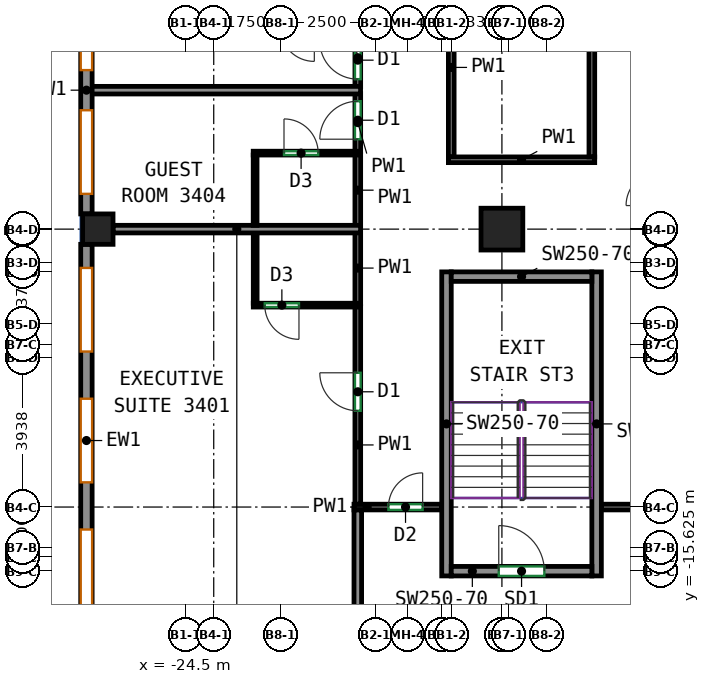
"""IFC4 building model, lengths in metres.
Left out: names, types, materials, properties, quantities, classifications, styles, units other than length and angle.
Written with IfcOpenShell. Run it as: python <this file> out.ifc"""

import sys

from ifc_helpers import new_model, si_unit, direction, frame, frame_2d, origin, origin_2d, place, context, subcontext, project, spatial, rectangle, extrude, source, transform, mapped, element, fill, save


model = new_model("IFC4")
c1 = context("Model", 3, precision=1e-05, world=origin(), true_north=direction((0.0, 1.0)))
c2 = subcontext(c1, "Body", "Model", "MODEL_VIEW")
j1 = project(units=[si_unit("LENGTHUNIT", "METRE"), si_unit("PLANEANGLEUNIT", "RADIAN")], contexts=[c1])
p1 = place(None, origin())
s1 = spatial("IfcSite", under=j1, at=p1, CompositionType="ELEMENT")
p2 = place(p1, origin())
s2 = spatial("IfcBuilding", under=s1, at=p2, CompositionType="ELEMENT")
p3 = place(p2, frame((0.0, 0.0, 150.7)))
s3 = spatial("IfcBuildingStorey", under=s2, at=p3, CompositionType="ELEMENT", Elevation=150.7)
m1 = source(origin(), c2, "Body", "SweptSolid", [
    extrude(rectangle(XDim=0.8, YDim=0.8, at=origin_2d()), origin(), (0.0, 0.0, 1.0), 3.12),
])
p4 = place(p3, frame((-26.8, -6.625, 0.0), z_axis=(0.0, 0.0, 1.0), x_axis=(1.0, 0.0, 0.0)))
e1 = element("IfcColumn", 1, at=p4, inside=s3, PredefinedType="COLUMN", context=c2, shape_type="MappedRepresentation", body=[
    mapped(m1, transform((0.0, 0.0, 0.0))),
])
m2 = source(origin(), c2, "Body", "SweptSolid", [
    extrude(rectangle(XDim=1.1, YDim=1.1, at=origin_2d()), origin(), (0.0, 0.0, 1.0), 3.12),
])
p5 = place(p3, frame((-16.167, -6.625, 0.0), z_axis=(0.0, 0.0, 1.0), x_axis=(1.0, 0.0, 0.0)))
e2 = element("IfcColumn", 2, at=p5, inside=s3, PredefinedType="COLUMN", context=c2, shape_type="MappedRepresentation", body=[
    mapped(m2, transform((0.0, 0.0, 0.0))),
])
m3 = source(origin(), c2, "Body", "SweptSolid", [
    extrude(rectangle(XDim=8.0, YDim=0.25, at=frame_2d((4.0, 0.0))), origin(), (0.0, 0.0, 1.0), 3.12),
])
for number, where, z_axis, x_axis in (
    (3, (-17.625, -15.75, 0.0), (0.0, 0.0, 1.0), (0.0, 1.0, 0.0)),
    (4, (-13.675, -15.75, 0.0), (0.0, 0.0, 1.0), (0.0, 1.0, 0.0)),
):
    element("IfcWall", number, at=place(p3, frame(where, z_axis=z_axis, x_axis=x_axis)), inside=s3, PredefinedType="SHEAR", context=c2, shape_type="MappedRepresentation", body=[
        mapped(m3, transform((0.0, 0.0, 0.0))),
    ])
m4 = source(origin(), c2, "Body", "SweptSolid", [
    extrude(rectangle(XDim=3.7, YDim=0.25, at=frame_2d((1.85, 0.0))), origin(), (0.0, 0.0, 1.0), 3.12),
])
p6 = place(p3, frame((-17.5, -15.625, 0.0), z_axis=(0.0, 0.0, 1.0), x_axis=(1.0, 0.0, 0.0)))
e5 = element("IfcWall", 5, at=p6, inside=s3, PredefinedType="SHEAR", context=c2, shape_type="MappedRepresentation", body=[
    mapped(m4, transform((0.0, 0.0, 0.0))),
])
p7 = place(p6, frame((1.25, 0.0, 0.0)))
e6 = element("IfcOpeningElement", 6, at=p7, cuts=e5, PredefinedType="OPENING", context=c2, shape_type="SweptSolid", body=[
    extrude(rectangle(XDim=1.2, YDim=2.1, at=frame_2d((0.6, 1.05))), frame((0.0, 0.135, 0.0), z_axis=(0.0, -1.0, 0.0), x_axis=(1.0, 0.0, 0.0)), (0.0, 0.0, 1.0), 0.27),
])
p8 = place(p3, frame((-17.5, -7.875, 0.0), z_axis=(0.0, 0.0, 1.0), x_axis=(1.0, 0.0, 0.0)))
e7 = element("IfcWall", 7, at=p8, inside=s3, PredefinedType="SHEAR", context=c2, shape_type="MappedRepresentation", body=[
    mapped(m4, transform((0.0, 0.0, 0.0))),
])
m5 = source(origin(), c2, "Body", "SweptSolid", [
    extrude(rectangle(XDim=6.513, YDim=0.3, at=frame_2d((3.256, 0.0))), origin(), (0.0, 0.0, 1.0), 3.12),
])
p9 = place(p3, frame((-27.1, 0.288, 0.0), z_axis=(0.0, 0.0, 1.0), x_axis=(0.0, -1.0, 0.0)))
e8 = element("IfcWall", 8, at=p9, inside=s3, PredefinedType="SOLIDWALL", context=c2, shape_type="MappedRepresentation", body=[
    mapped(m5, transform((0.0, 0.0, 0.0))),
])
p10 = place(p9, frame((0.528, 0.0, 0.85)))
e9 = element("IfcOpeningElement", 9, at=p10, cuts=e8, PredefinedType="OPENING", context=c2, shape_type="SweptSolid", body=[
    extrude(rectangle(XDim=2.2, YDim=1.95, at=frame_2d((1.1, 0.975))), frame((0.0, 0.16, 0.0), z_axis=(0.0, -1.0, 0.0), x_axis=(1.0, 0.0, 0.0)), (0.0, 0.0, 1.0), 0.32),
])
p11 = place(p9, frame((3.784, 0.0, 0.85)))
e10 = element("IfcOpeningElement", 10, at=p11, cuts=e8, PredefinedType="OPENING", context=c2, shape_type="SweptSolid", body=[
    extrude(rectangle(XDim=2.2, YDim=1.95, at=frame_2d((1.1, 0.975))), frame((0.0, 0.16, 0.0), z_axis=(0.0, -1.0, 0.0), x_axis=(1.0, 0.0, 0.0)), (0.0, 0.0, 1.0), 0.32),
])
m6 = source(origin(), c2, "Body", "SweptSolid", [
    extrude(rectangle(XDim=10.325, YDim=0.3, at=frame_2d((5.163, 0.0))), origin(), (0.0, 0.0, 1.0), 3.12),
])
p12 = place(p3, frame((-27.1, -7.025, 0.0), z_axis=(0.0, 0.0, 1.0), x_axis=(0.0, -1.0, 0.0)))
e11 = element("IfcWall", 11, at=p12, inside=s3, PredefinedType="SOLIDWALL", context=c2, shape_type="MappedRepresentation", body=[
    mapped(m6, transform((0.0, 0.0, 0.0))),
])
p13 = place(p12, frame((0.621, 0.0, 0.85)))
e12 = element("IfcOpeningElement", 12, at=p13, cuts=e11, PredefinedType="OPENING", context=c2, shape_type="SweptSolid", body=[
    extrude(rectangle(XDim=2.2, YDim=1.95, at=frame_2d((1.1, 0.975))), frame((0.0, 0.16, 0.0), z_axis=(0.0, -1.0, 0.0), x_axis=(1.0, 0.0, 0.0)), (0.0, 0.0, 1.0), 0.32),
])
p14 = place(p12, frame((4.062, 0.0, 0.85)))
e13 = element("IfcOpeningElement", 13, at=p14, cuts=e11, PredefinedType="OPENING", context=c2, shape_type="SweptSolid", body=[
    extrude(rectangle(XDim=2.2, YDim=1.95, at=frame_2d((1.1, 0.975))), frame((0.0, 0.16, 0.0), z_axis=(0.0, -1.0, 0.0), x_axis=(1.0, 0.0, 0.0)), (0.0, 0.0, 1.0), 0.32),
])
p15 = place(p12, frame((7.504, 0.0, 0.85)))
e14 = element("IfcOpeningElement", 14, at=p15, cuts=e11, PredefinedType="OPENING", context=c2, shape_type="SweptSolid", body=[
    extrude(rectangle(XDim=2.2, YDim=1.95, at=frame_2d((1.1, 0.975))), frame((0.0, 0.16, 0.0), z_axis=(0.0, -1.0, 0.0), x_axis=(1.0, 0.0, 0.0)), (0.0, 0.0, 1.0), 0.32),
])
p16 = place(p3, frame((-13.55, -13.938, 0.0), z_axis=(0.0, 0.0, 1.0), x_axis=(1.0, 0.0, 0.0)))
e15 = element("IfcWall", 15, at=p16, inside=s3, PredefinedType="PARTITIONING", context=c2, shape_type="SweptSolid", body=[
    extrude(rectangle(XDim=4.417, YDim=0.15, at=frame_2d((2.208, 0.0))), origin(), (0.0, 0.0, 1.0), 3.12),
])
p17 = place(p16, frame((1.468, 0.0, 0.0)))
e16 = element("IfcOpeningElement", 16, at=p17, cuts=e15, PredefinedType="OPENING", context=c2, shape_type="SweptSolid", body=[
    extrude(rectangle(XDim=1.0, YDim=2.1, at=frame_2d((0.5, 1.05))), frame((0.0, 0.085, 0.0), z_axis=(0.0, -1.0, 0.0), x_axis=(1.0, 0.0, 0.0)), (0.0, 0.0, 1.0), 0.17),
])
p18 = place(p3, frame((-20.059, -13.938, 0.0), z_axis=(0.0, 0.0, 1.0), x_axis=(1.0, 0.0, 0.0)))
e17 = element("IfcWall", 17, at=p18, inside=s3, PredefinedType="PARTITIONING", context=c2, shape_type="SweptSolid", body=[
    extrude(rectangle(XDim=2.309, YDim=0.15, at=frame_2d((1.155, 0.0))), origin(), (0.0, 0.0, 1.0), 3.12),
])
p19 = place(p18, frame((0.906, 0.0, 0.0)))
e18 = element("IfcOpeningElement", 18, at=p19, cuts=e17, PredefinedType="OPENING", context=c2, shape_type="SweptSolid", body=[
    extrude(rectangle(XDim=0.9, YDim=2.1, at=frame_2d((0.45, 1.05))), frame((0.0, 0.085, 0.0), z_axis=(0.0, -1.0, 0.0), x_axis=(1.0, 0.0, 0.0)), (0.0, 0.0, 1.0), 0.17),
])
p20 = place(p3, frame((-19.959, -13.863, 0.0), z_axis=(0.0, 0.0, 1.0), x_axis=(0.0, 1.0, 0.0)))
e19 = element("IfcWall", 19, at=p20, inside=s3, PredefinedType="PARTITIONING", context=c2, shape_type="SweptSolid", body=[
    extrude(rectangle(XDim=5.198, YDim=0.15, at=frame_2d((2.599, 0.0))), origin(), (0.0, 0.0, 1.0), 3.12),
])
p21 = place(p20, frame((2.458, 0.0, 0.0)))
e20 = element("IfcOpeningElement", 20, at=p21, cuts=e19, PredefinedType="OPENING", context=c2, shape_type="SweptSolid", body=[
    extrude(rectangle(XDim=1.0, YDim=2.1, at=frame_2d((0.5, 1.05))), frame((0.0, 0.085, 0.0), z_axis=(0.0, -1.0, 0.0), x_axis=(1.0, 0.0, 0.0)), (0.0, 0.0, 1.0), 0.17),
])
p22 = place(p3, frame((-19.959, -8.585, 0.0), z_axis=(0.0, 0.0, 1.0), x_axis=(0.0, 1.0, 0.0)))
e21 = element("IfcWall", 21, at=p22, inside=s3, PredefinedType="PARTITIONING", context=c2, shape_type="SweptSolid", body=[
    extrude(rectangle(XDim=1.87, YDim=0.15, at=frame_2d((0.935, 0.0))), origin(), (0.0, 0.0, 1.0), 3.12),
])
p23 = place(p3, frame((-19.959, -4.585, 0.0), z_axis=(0.0, 0.0, 1.0), x_axis=(0.0, 1.0, 0.0)))
e22 = element("IfcWall", 22, at=p23, inside=s3, PredefinedType="PARTITIONING", context=c2, shape_type="SweptSolid", body=[
    extrude(rectangle(XDim=1.526, YDim=0.15, at=frame_2d((0.763, 0.0))), origin(), (0.0, 0.0, 1.0), 3.12),
])
p24 = place(p23, frame((0.326, 0.0, 0.0)))
e23 = element("IfcOpeningElement", 23, at=p24, cuts=e22, PredefinedType="OPENING", context=c2, shape_type="SweptSolid", body=[
    extrude(rectangle(XDim=1.0, YDim=2.1, at=frame_2d((0.5, 1.05))), frame((0.0, 0.085, 0.0), z_axis=(0.0, -1.0, 0.0), x_axis=(1.0, 0.0, 0.0)), (0.0, 0.0, 1.0), 0.17),
])
p25 = place(p3, frame((-19.959, -6.535, 0.0), z_axis=(0.0, 0.0, 1.0), x_axis=(0.0, 1.0, 0.0)))
e24 = element("IfcWall", 24, at=p25, inside=s3, PredefinedType="PARTITIONING", context=c2, shape_type="SweptSolid", body=[
    extrude(rectangle(XDim=1.87, YDim=0.15, at=frame_2d((0.935, 0.0))), origin(), (0.0, 0.0, 1.0), 3.12),
])
p26 = place(p3, frame((-19.959, -2.879, 0.0), z_axis=(0.0, 0.0, 1.0), x_axis=(0.0, 1.0, 0.0)))
e25 = element("IfcWall", 25, at=p26, inside=s3, PredefinedType="PARTITIONING", context=c2, shape_type="SweptSolid", body=[
    extrude(rectangle(XDim=1.527, YDim=0.15, at=frame_2d((0.763, 0.0))), origin(), (0.0, 0.0, 1.0), 3.12),
])
p27 = place(p26, frame((0.2, 0.0, 0.0)))
e26 = element("IfcOpeningElement", 26, at=p27, cuts=e25, PredefinedType="OPENING", context=c2, shape_type="SweptSolid", body=[
    extrude(rectangle(XDim=1.0, YDim=2.1, at=frame_2d((0.5, 1.05))), frame((0.0, 0.085, 0.0), z_axis=(0.0, -1.0, 0.0), x_axis=(1.0, 0.0, 0.0)), (0.0, 0.0, 1.0), 0.17),
])
p28 = place(p3, frame((-17.5, -4.725, 0.0), z_axis=(0.0, 0.0, 1.0), x_axis=(0.0, 1.0, 0.0)))
e27 = element("IfcWall", 27, at=p28, inside=s3, PredefinedType="PARTITIONING", context=c2, shape_type="SweptSolid", body=[
    extrude(rectangle(XDim=7.85, YDim=0.15, at=frame_2d((3.925, 0.0))), origin(), (0.0, 0.0, 1.0), 3.12),
])
p29 = place(p28, frame((3.223, 0.0, 0.0)))
e28 = element("IfcOpeningElement", 28, at=p29, cuts=e27, PredefinedType="OPENING", context=c2, shape_type="SweptSolid", body=[
    extrude(rectangle(XDim=0.9, YDim=2.1, at=frame_2d((0.45, 1.05))), frame((0.0, 0.085, 0.0), z_axis=(0.0, -1.0, 0.0), x_axis=(1.0, 0.0, 0.0)), (0.0, 0.0, 1.0), 0.17),
])
p30 = place(p3, frame((-13.725, -4.8, 0.0), z_axis=(0.0, 0.0, 1.0), x_axis=(-1.0, 0.0, 0.0)))
e29 = element("IfcWall", 29, at=p30, inside=s3, PredefinedType="PARTITIONING", context=c2, shape_type="SweptSolid", body=[
    extrude(rectangle(XDim=3.85, YDim=0.15, at=frame_2d((1.925, 0.0))), origin(), (0.0, 0.0, 1.0), 3.12),
])
p31 = place(p3, frame((-13.8, 3.125, 0.0), z_axis=(0.0, 0.0, 1.0), x_axis=(0.0, -1.0, 0.0)))
e30 = element("IfcWall", 30, at=p31, inside=s3, PredefinedType="PARTITIONING", context=c2, shape_type="SweptSolid", body=[
    extrude(rectangle(XDim=7.85, YDim=0.15, at=frame_2d((3.925, 0.0))), origin(), (0.0, 0.0, 1.0), 3.12),
])
p32 = place(p3, frame((-19.959, -21.0, 0.0), z_axis=(0.0, 0.0, 1.0), x_axis=(0.0, 1.0, 0.0)))
e31 = element("IfcWall", 31, at=p32, inside=s3, PredefinedType="PARTITIONING", context=c2, shape_type="SweptSolid", body=[
    extrude(rectangle(XDim=6.985, YDim=0.2, at=frame_2d((3.493, 0.0))), origin(), (0.0, 0.0, 1.0), 3.12),
])
p33 = place(p3, frame((-22.659, -8.575, 0.0), z_axis=(0.0, 0.0, 1.0), x_axis=(0.0, 1.0, 0.0)))
e32 = element("IfcWall", 32, at=p33, inside=s3, PredefinedType="PARTITIONING", context=c2, shape_type="SweptSolid", body=[
    extrude(rectangle(XDim=1.85, YDim=0.1, at=frame_2d((0.925, 0.0))), origin(), (0.0, 0.0, 1.0), 3.12),
])
p34 = place(p3, frame((-19.886, -8.625, 0.0), z_axis=(0.0, 0.0, 1.0), x_axis=(-1.0, 0.0, 0.0)))
e33 = element("IfcWall", 33, at=p34, inside=s3, PredefinedType="PARTITIONING", context=c2, shape_type="SweptSolid", body=[
    extrude(rectangle(XDim=2.823, YDim=0.1, at=frame_2d((1.412, 0.0))), origin(), (0.0, 0.0, 1.0), 3.12),
])
p35 = place(p34, frame((1.621, 0.0, 0.0)))
e34 = element("IfcOpeningElement", 34, at=p35, cuts=e33, PredefinedType="OPENING", context=c2, shape_type="SweptSolid", body=[
    extrude(rectangle(XDim=0.9, YDim=2.1, at=frame_2d((0.45, 1.05))), frame((0.0, 0.06, 0.0), z_axis=(0.0, -1.0, 0.0), x_axis=(1.0, 0.0, 0.0)), (0.0, 0.0, 1.0), 0.12),
])
p36 = place(p3, frame((-26.4, -6.625, 0.0), z_axis=(0.0, 0.0, 1.0), x_axis=(1.0, 0.0, 0.0)))
e35 = element("IfcWall", 35, at=p36, inside=s3, PredefinedType="PARTITIONING", context=c2, shape_type="SweptSolid", body=[
    extrude(rectangle(XDim=6.514, YDim=0.2, at=frame_2d((3.257, 0.0))), origin(), (0.0, 0.0, 1.0), 2.52),
])
p37 = place(p3, frame((-22.711, -4.625, 0.0), z_axis=(0.0, 0.0, 1.0), x_axis=(1.0, 0.0, 0.0)))
e36 = element("IfcWall", 36, at=p37, inside=s3, PredefinedType="PARTITIONING", context=c2, shape_type="SweptSolid", body=[
    extrude(rectangle(XDim=2.825, YDim=0.1, at=frame_2d((1.413, 0.0))), origin(), (0.0, 0.0, 1.0), 3.12),
])
p38 = place(p37, frame((0.81, 0.0, 0.0)))
e37 = element("IfcOpeningElement", 37, at=p38, cuts=e36, PredefinedType="OPENING", context=c2, shape_type="SweptSolid", body=[
    extrude(rectangle(XDim=0.9, YDim=2.1, at=frame_2d((0.45, 1.05))), frame((0.0, 0.06, 0.0), z_axis=(0.0, -1.0, 0.0), x_axis=(1.0, 0.0, 0.0)), (0.0, 0.0, 1.0), 0.12),
])
p39 = place(p3, frame((-22.661, -6.525, 0.0), z_axis=(0.0, 0.0, 1.0), x_axis=(0.0, 1.0, 0.0)))
e38 = element("IfcWall", 38, at=p39, inside=s3, PredefinedType="PARTITIONING", context=c2, shape_type="SweptSolid", body=[
    extrude(rectangle(XDim=1.85, YDim=0.1, at=frame_2d((0.925, 0.0))), origin(), (0.0, 0.0, 1.0), 3.12),
])
p40 = place(p3, frame((-19.886, -2.969, 0.0), z_axis=(0.0, 0.0, 1.0), x_axis=(-1.0, 0.0, 0.0)))
e39 = element("IfcWall", 39, at=p40, inside=s3, PredefinedType="PARTITIONING", context=c2, shape_type="SweptSolid", body=[
    extrude(rectangle(XDim=7.114, YDim=0.2, at=frame_2d((3.557, 0.0))), origin(), (0.0, 0.0, 1.0), 3.12),
])
p41 = place(p10, origin())
e40 = element("IfcWindow", 40, at=p41, inside=s3, PartitioningType="SINGLE_PANEL", PredefinedType="WINDOW", context=c2, shape_type="SweptSolid", body=[
    extrude(rectangle(XDim=2.2, YDim=1.95, at=frame_2d((1.1, 0.975))), frame((0.0, 0.03, 0.0), z_axis=(0.0, -1.0, 0.0), x_axis=(1.0, 0.0, 0.0)), (0.0, 0.0, 1.0), 0.06),
])
fill(e9, e40)
p42 = place(p11, origin())
e41 = element("IfcWindow", 41, at=p42, inside=s3, PartitioningType="SINGLE_PANEL", PredefinedType="WINDOW", context=c2, shape_type="SweptSolid", body=[
    extrude(rectangle(XDim=2.2, YDim=1.95, at=frame_2d((1.1, 0.975))), frame((0.0, 0.03, 0.0), z_axis=(0.0, -1.0, 0.0), x_axis=(1.0, 0.0, 0.0)), (0.0, 0.0, 1.0), 0.06),
])
fill(e10, e41)
p43 = place(p13, origin())
e42 = element("IfcWindow", 42, at=p43, inside=s3, PartitioningType="SINGLE_PANEL", PredefinedType="WINDOW", context=c2, shape_type="SweptSolid", body=[
    extrude(rectangle(XDim=2.2, YDim=1.95, at=frame_2d((1.1, 0.975))), frame((0.0, 0.03, 0.0), z_axis=(0.0, -1.0, 0.0), x_axis=(1.0, 0.0, 0.0)), (0.0, 0.0, 1.0), 0.06),
])
fill(e12, e42)
p44 = place(p14, origin())
e43 = element("IfcWindow", 43, at=p44, inside=s3, PartitioningType="SINGLE_PANEL", PredefinedType="WINDOW", context=c2, shape_type="SweptSolid", body=[
    extrude(rectangle(XDim=2.2, YDim=1.95, at=frame_2d((1.1, 0.975))), frame((0.0, 0.03, 0.0), z_axis=(0.0, -1.0, 0.0), x_axis=(1.0, 0.0, 0.0)), (0.0, 0.0, 1.0), 0.06),
])
fill(e13, e43)
p45 = place(p15, origin())
e44 = element("IfcWindow", 44, at=p45, inside=s3, PartitioningType="SINGLE_PANEL", PredefinedType="WINDOW", context=c2, shape_type="SweptSolid", body=[
    extrude(rectangle(XDim=2.2, YDim=1.95, at=frame_2d((1.1, 0.975))), frame((0.0, 0.03, 0.0), z_axis=(0.0, -1.0, 0.0), x_axis=(1.0, 0.0, 0.0)), (0.0, 0.0, 1.0), 0.06),
])
fill(e14, e44)
p46 = place(p7, origin())
e45 = element("IfcDoor", 45, at=p46, inside=s3, OperationType="DOUBLE_DOOR_SINGLE_SWING", PredefinedType="DOOR", context=c2, shape_type="SweptSolid", body=[
    extrude(rectangle(XDim=1.2, YDim=2.1, at=frame_2d((0.6, 1.05))), frame((0.0, 0.025, 0.0), z_axis=(0.0, -1.0, 0.0), x_axis=(1.0, 0.0, 0.0)), (0.0, 0.0, 1.0), 0.05),
])
fill(e6, e45)
p47 = place(p19, origin())
e46 = element("IfcDoor", 46, at=p47, inside=s3, OperationType="SINGLE_SWING_RIGHT", PredefinedType="DOOR", context=c2, shape_type="SweptSolid", body=[
    extrude(rectangle(XDim=0.9, YDim=2.1, at=frame_2d((0.45, 1.05))), frame((0.0, 0.025, 0.0), z_axis=(0.0, -1.0, 0.0), x_axis=(1.0, 0.0, 0.0)), (0.0, 0.0, 1.0), 0.05),
])
fill(e18, e46)
p48 = place(p21, origin())
e47 = element("IfcDoor", 47, at=p48, inside=s3, OperationType="SINGLE_SWING_RIGHT", PredefinedType="DOOR", context=c2, shape_type="SweptSolid", body=[
    extrude(rectangle(XDim=1.0, YDim=2.1, at=frame_2d((0.5, 1.05))), frame((0.0, 0.025, 0.0), z_axis=(0.0, -1.0, 0.0), x_axis=(1.0, 0.0, 0.0)), (0.0, 0.0, 1.0), 0.05),
])
fill(e20, e47)
p49 = place(p35, origin())
e48 = element("IfcDoor", 48, at=p49, inside=s3, OperationType="SINGLE_SWING_LEFT", PredefinedType="DOOR", context=c2, shape_type="SweptSolid", body=[
    extrude(rectangle(XDim=0.9, YDim=2.1, at=frame_2d((0.45, 1.05))), frame((0.0, 0.025, 0.0), z_axis=(0.0, -1.0, 0.0), x_axis=(1.0, 0.0, 0.0)), (0.0, 0.0, 1.0), 0.05),
])
fill(e34, e48)
p50 = place(p38, origin())
e49 = element("IfcDoor", 49, at=p50, inside=s3, OperationType="SINGLE_SWING_LEFT", PredefinedType="DOOR", context=c2, shape_type="SweptSolid", body=[
    extrude(rectangle(XDim=0.9, YDim=2.1, at=frame_2d((0.45, 1.05))), frame((0.0, 0.025, 0.0), z_axis=(0.0, -1.0, 0.0), x_axis=(1.0, 0.0, 0.0)), (0.0, 0.0, 1.0), 0.05),
])
fill(e37, e49)
p51 = place(p24, origin())
e50 = element("IfcDoor", 50, at=p51, inside=s3, OperationType="SINGLE_SWING_LEFT", PredefinedType="DOOR", context=c2, shape_type="SweptSolid", body=[
    extrude(rectangle(XDim=1.0, YDim=2.1, at=frame_2d((0.5, 1.05))), frame((0.0, 0.025, 0.0), z_axis=(0.0, -1.0, 0.0), x_axis=(1.0, 0.0, 0.0)), (0.0, 0.0, 1.0), 0.05),
])
fill(e23, e50)
p52 = place(p27, origin())
e51 = element("IfcDoor", 51, at=p52, inside=s3, OperationType="SINGLE_SWING_RIGHT", PredefinedType="DOOR", context=c2, shape_type="SweptSolid", body=[
    extrude(rectangle(XDim=1.0, YDim=2.1, at=frame_2d((0.5, 1.05))), frame((0.0, 0.025, 0.0), z_axis=(0.0, -1.0, 0.0), x_axis=(1.0, 0.0, 0.0)), (0.0, 0.0, 1.0), 0.05),
])
fill(e26, e51)
save(model, sys.argv[1])
